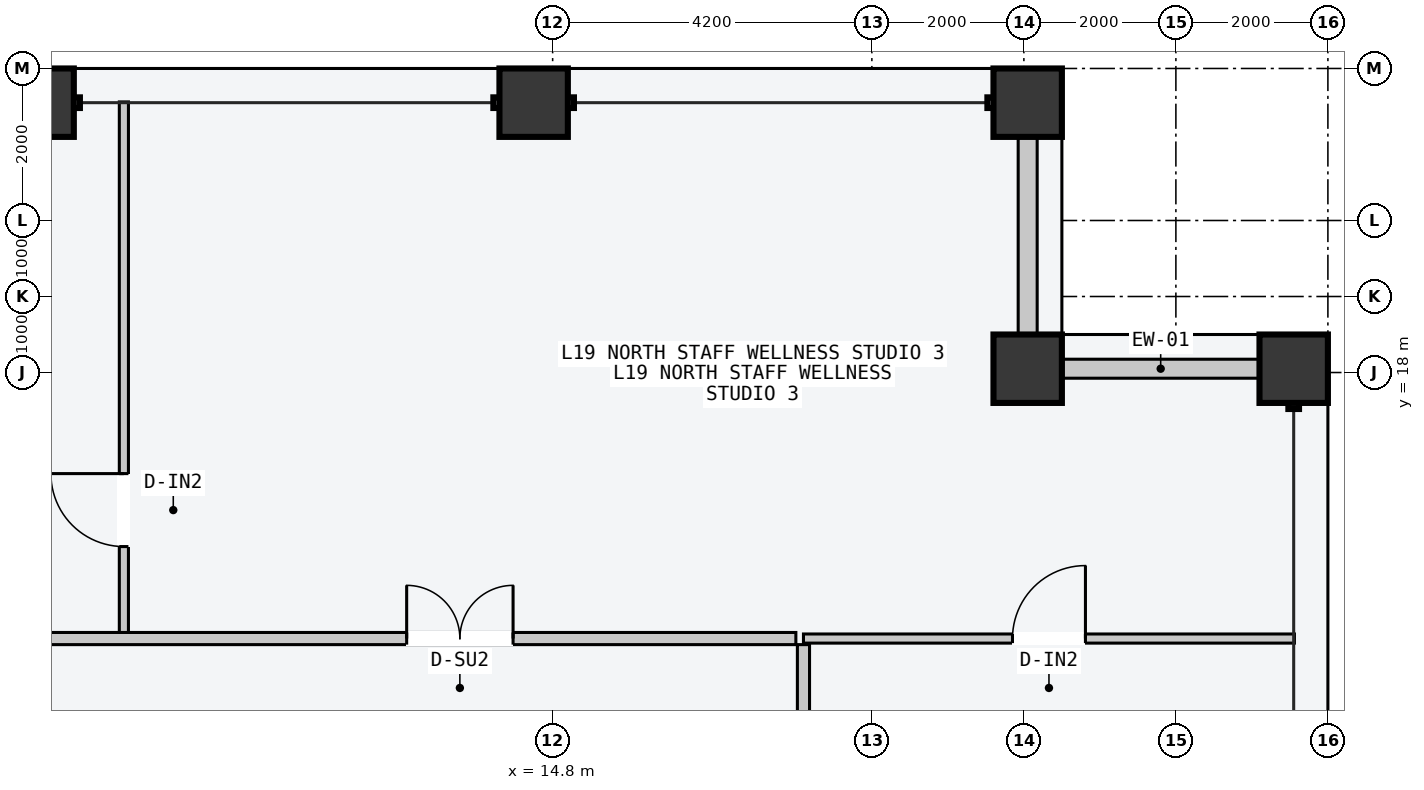
"""IFC4 building model, lengths in metres.
Left out: names, types, materials, properties, quantities, classifications, styles, units other than length and angle.
Written with IfcOpenShell. Run it as: python <this file> out.ifc"""

import sys

from ifc_helpers import new_model, si_unit, direction, frame, frame_2d, origin, origin_2d, place, context, subcontext, project, spatial, rectangle, hollow_rectangle, extrude, element, fill, save


model = new_model("IFC4")
c1 = context("Model", 3, precision=1e-05, world=origin(), true_north=direction((0.0, 1.0)))
c2 = subcontext(c1, "Body", "Model", "MODEL_VIEW")
j1 = project(units=[si_unit("LENGTHUNIT", "METRE"), si_unit("PLANEANGLEUNIT", "RADIAN")], contexts=[c1])
p1 = place(None, origin())
s1 = spatial("IfcSite", under=j1, at=p1, CompositionType="ELEMENT")
p2 = place(p1, origin())
s2 = spatial("IfcBuilding", under=s1, at=p2, CompositionType="ELEMENT")
p3 = place(p2, frame((0.0, 0.0, 74.4)))
s3 = spatial("IfcBuildingStorey", under=s2, at=p3, CompositionType="ELEMENT", Elevation=74.4)
for number, where, z_axis, x_axis in (
    (1, (8.05, 21.55, 0.0), (0.0, 0.0, 1.0), (1.0, 0.0, 0.0)),
    (2, (14.55, 21.55, 0.0), (0.0, 0.0, 1.0), (1.0, 0.0, 0.0)),
    (3, (21.05, 21.55, 0.0), (0.0, 0.0, 1.0), (1.0, 0.0, 0.0)),
    (4, (24.55, 18.05, 0.0), (0.0, 0.0, 1.0), (0.0, 1.0, 0.0)),
    (5, (21.05, 18.05, 0.0), (0.0, 0.0, 1.0), (1.0, 0.0, 0.0)),
):
    element("IfcColumn", number, at=place(p3, frame(where, z_axis=z_axis, x_axis=x_axis)), inside=s3, PredefinedType="COLUMN", context=c2, shape_type="SweptSolid", body=[
        extrude(hollow_rectangle(XDim=0.9, YDim=0.9, WallThickness=0.045, at=origin_2d()), origin(), (0.0, 0.0, 1.0), 3.6),
    ])
for number, where, z_axis, x_axis in (
    (6, (21.51, 18.05, 0.0), (0.0, 0.0, 1.0), (1.0, 0.0, 0.0)),
    (7, (21.05, 18.51, 0.0), (0.0, 0.0, 1.0), (0.0, 1.0, 0.0)),
):
    element("IfcWall", number, at=place(p3, frame(where, z_axis=z_axis, x_axis=x_axis)), inside=s3, PredefinedType="STANDARD", context=c2, shape_type="SweptSolid", body=[
        extrude(rectangle(XDim=2.58, YDim=0.25, at=frame_2d((1.29, 0.0))), origin(), (0.0, 0.0, 1.0), 2.7),
    ])
p4 = place(p3, frame((9.159, 14.56, 0.0), z_axis=(0.0, 0.0, 1.0), x_axis=(0.0, 1.0, 0.0)))
e8 = element("IfcWall", 8, at=p4, inside=s3, PredefinedType="PARTITIONING", context=c2, shape_type="SweptSolid", body=[
    extrude(rectangle(XDim=7.0, YDim=0.12, at=frame_2d((3.5, 0.0))), origin(), (0.0, 0.0, 1.0), 3.4),
])
p5 = place(p4, frame((1.15, 0.0, 0.0)))
e9 = element("IfcOpeningElement", 9, at=p5, cuts=e8, PredefinedType="OPENING", context=c2, shape_type="SweptSolid", body=[
    extrude(rectangle(XDim=0.96, YDim=2.18, at=frame_2d((0.48, 1.09))), frame((0.0, 0.07, 0.0), z_axis=(0.0, -1.0, 0.0), x_axis=(1.0, 0.0, 0.0)), (0.0, 0.0, 1.0), 0.14),
])
p6 = place(p3, frame((-18.0, 14.5, 0.0), z_axis=(0.0, 0.0, 1.0), x_axis=(1.0, 0.0, 0.0)))
e10 = element("IfcWall", 10, at=p6, inside=s3, PredefinedType="PARTITIONING", context=c2, shape_type="SweptSolid", body=[
    extrude(rectangle(XDim=36.0, YDim=0.16, at=frame_2d((18.0, 0.0))), origin(), (0.0, 0.0, 1.0), 3.4),
])
p7 = place(p6, frame((4.09, 0.0, 0.0)))
e11 = element("IfcOpeningElement", 11, at=p7, cuts=e10, PredefinedType="OPENING", context=c2, shape_type="SweptSolid", body=[
    extrude(rectangle(XDim=1.06, YDim=2.2, at=frame_2d((0.53, 1.1))), frame((0.0, 0.09, 0.0), z_axis=(0.0, -1.0, 0.0), x_axis=(1.0, 0.0, 0.0)), (0.0, 0.0, 1.0), 0.18),
])
p8 = place(p6, frame((17.579, 0.0, 0.0)))
e12 = element("IfcOpeningElement", 12, at=p8, cuts=e10, PredefinedType="OPENING", context=c2, shape_type="SweptSolid", body=[
    extrude(rectangle(XDim=1.24, YDim=2.24, at=frame_2d((0.62, 1.12))), frame((0.0, 0.09, 0.0), z_axis=(0.0, -1.0, 0.0), x_axis=(1.0, 0.0, 0.0)), (0.0, 0.0, 1.0), 0.18),
])
p9 = place(p6, frame((30.879, 0.0, 0.0)))
e13 = element("IfcOpeningElement", 13, at=p9, cuts=e10, PredefinedType="OPENING", context=c2, shape_type="SweptSolid", body=[
    extrude(rectangle(XDim=1.4, YDim=2.2, at=frame_2d((0.7, 1.1))), frame((0.0, 0.09, 0.0), z_axis=(0.0, -1.0, 0.0), x_axis=(1.0, 0.0, 0.0)), (0.0, 0.0, 1.0), 0.18),
])
p10 = place(p3, frame((18.1, 14.5, 0.0), z_axis=(0.0, 0.0, 1.0), x_axis=(1.0, 0.0, 0.0)))
e14 = element("IfcWall", 14, at=p10, inside=s3, PredefinedType="PARTITIONING", context=c2, shape_type="SweptSolid", body=[
    extrude(rectangle(XDim=6.46, YDim=0.12, at=frame_2d((3.23, 0.0))), origin(), (0.0, 0.0, 1.0), 3.4),
])
p11 = place(p10, frame((2.75, 0.0, 0.0)))
e15 = element("IfcOpeningElement", 15, at=p11, cuts=e14, PredefinedType="OPENING", context=c2, shape_type="SweptSolid", body=[
    extrude(rectangle(XDim=0.96, YDim=2.18, at=frame_2d((0.48, 1.09))), frame((0.0, 0.07, 0.0), z_axis=(0.0, -1.0, 0.0), x_axis=(1.0, 0.0, 0.0)), (0.0, 0.0, 1.0), 0.14),
])
p12 = place(p3, frame((18.1, -14.42, 0.0), z_axis=(0.0, 0.0, 1.0), x_axis=(0.0, 1.0, 0.0)))
e16 = element("IfcWall", 16, at=p12, inside=s3, PredefinedType="PARTITIONING", context=c2, shape_type="SweptSolid", body=[
    extrude(rectangle(XDim=28.84, YDim=0.16, at=frame_2d((14.42, 0.0))), origin(), (0.0, 0.0, 1.0), 3.4),
])
p13 = place(p12, frame((13.8, 0.0, 0.0)))
e17 = element("IfcOpeningElement", 17, at=p13, cuts=e16, PredefinedType="OPENING", context=c2, shape_type="SweptSolid", body=[
    extrude(rectangle(XDim=1.24, YDim=2.24, at=frame_2d((0.62, 1.12))), frame((0.0, 0.09, 0.0), z_axis=(0.0, -1.0, 0.0), x_axis=(1.0, 0.0, 0.0)), (0.0, 0.0, 1.0), 0.18),
])
p14 = place(p5, origin())
e18 = element("IfcDoor", 18, at=p14, inside=s3, OperationType="SINGLE_SWING_RIGHT", PredefinedType="DOOR", context=c2, shape_type="SweptSolid", body=[
    extrude(rectangle(XDim=0.96, YDim=2.18, at=frame_2d((0.48, 1.09))), frame((0.0, 0.025, 0.0), z_axis=(0.0, -1.0, 0.0), x_axis=(1.0, 0.0, 0.0)), (0.0, 0.0, 1.0), 0.05),
])
fill(e9, e18)
p15 = place(p9, origin())
e19 = element("IfcDoor", 19, at=p15, inside=s3, OperationType="DOUBLE_DOOR_SINGLE_SWING", PredefinedType="DOOR", context=c2, shape_type="SweptSolid", body=[
    extrude(rectangle(XDim=1.4, YDim=2.2, at=frame_2d((0.7, 1.1))), frame((0.0, 0.025, 0.0), z_axis=(0.0, -1.0, 0.0), x_axis=(1.0, 0.0, 0.0)), (0.0, 0.0, 1.0), 0.05),
])
fill(e13, e19)
p16 = place(p11, origin())
e20 = element("IfcDoor", 20, at=p16, inside=s3, OperationType="SINGLE_SWING_RIGHT", PredefinedType="DOOR", context=c2, shape_type="SweptSolid", body=[
    extrude(rectangle(XDim=0.96, YDim=2.18, at=frame_2d((0.48, 1.09))), frame((0.0, 0.025, 0.0), z_axis=(0.0, -1.0, 0.0), x_axis=(1.0, 0.0, 0.0)), (0.0, 0.0, 1.0), 0.05),
])
fill(e15, e20)
save(model, sys.argv[1])
